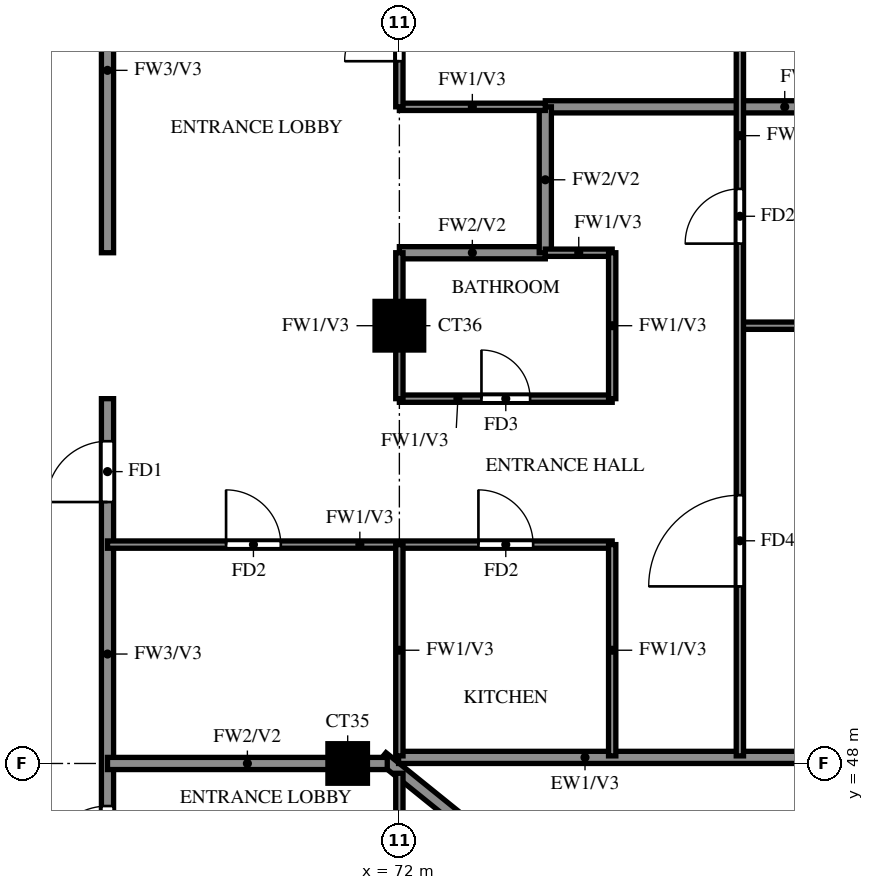
"""IFC4 building model, lengths in metres.
Left out: names, types, materials, properties, quantities, classifications, styles, units other than length and angle.
Written with IfcOpenShell. Run it as: python <this file> out.ifc"""

import sys

from ifc_helpers import new_model, si_unit, direction, frame, frame_2d, origin, origin_2d, place, context, subcontext, project, spatial, rectangle, extrude, source, transform, mapped, element, fill, save


model = new_model("IFC4")
c1 = context("Model", 3, precision=1e-05, world=origin(), true_north=direction((0.0, 1.0)))
c2 = subcontext(c1, "Body", "Model", "MODEL_VIEW")
j1 = project(units=[si_unit("LENGTHUNIT", "METRE"), si_unit("PLANEANGLEUNIT", "RADIAN")], contexts=[c1])
p1 = place(None, origin())
s1 = spatial("IfcSite", under=j1, at=p1, CompositionType="ELEMENT")
p2 = place(p1, origin())
s2 = spatial("IfcBuilding", under=s1, at=p2, CompositionType="ELEMENT")
p3 = place(p2, frame((0.0, 0.0, 243.0)))
s3 = spatial("IfcBuildingStorey", under=s2, at=p3, CompositionType="ELEMENT", Elevation=243.0)
m1 = source(origin(), c2, "Body", "SweptSolid", [
    extrude(rectangle(XDim=0.65, YDim=0.65, at=origin_2d()), origin(), (0.0, 0.0, 1.0), 3.22),
])
p4 = place(p3, frame((71.15, 48.0, 0.0), z_axis=(0.0, 0.0, 1.0), x_axis=(1.0, 0.0, 0.0)))
e1 = element("IfcColumn", 1, at=p4, inside=s3, PredefinedType="COLUMN", context=c2, shape_type="MappedRepresentation", body=[
    mapped(m1, transform((0.0, 0.0, 0.0))),
])
m2 = source(origin(), c2, "Body", "SweptSolid", [
    extrude(rectangle(XDim=0.8, YDim=0.8, at=origin_2d()), origin(), (0.0, 0.0, 1.0), 3.22),
])
p5 = place(p3, frame((72.0, 55.2, 0.0), z_axis=(0.0, 0.0, 1.0), x_axis=(1.0, 0.0, 0.0)))
e2 = element("IfcColumn", 2, at=p5, inside=s3, PredefinedType="COLUMN", context=c2, shape_type="MappedRepresentation", body=[
    mapped(m2, transform((0.0, 0.0, 0.0))),
])
p6 = place(p3, frame((81.907, 39.87, 0.0), z_axis=(0.0, 0.0, 1.0), x_axis=(-0.777936274417, 0.62834318087, 0.0)))
e3 = element("IfcWall", 3, at=p6, inside=s3, PredefinedType="SOLIDWALL", context=c2, shape_type="SweptSolid", body=[
    extrude(rectangle(XDim=13.099, YDim=0.2, at=frame_2d((6.549, 0.0))), origin(), (0.0, 0.0, 1.0), 3.22),
])
p7 = place(p6, frame((9.938, 0.0, 1.5)))
e4 = element("IfcOpeningElement", 4, at=p7, cuts=e3, PredefinedType="OPENING", context=c2, shape_type="SweptSolid", body=[
    extrude(rectangle(XDim=0.9, YDim=0.9, at=frame_2d((0.45, 0.45))), frame((0.0, 0.11, 0.0), z_axis=(0.0, -1.0, 0.0), x_axis=(1.0, 0.0, 0.0)), (0.0, 0.0, 1.0), 0.22),
])
p8 = place(p3, frame((71.987, 48.1, 0.0), z_axis=(0.0, 0.0, 1.0), x_axis=(1.0, 0.0, 0.0)))
e5 = element("IfcWall", 5, at=p8, inside=s3, PredefinedType="SOLIDWALL", context=c2, shape_type="SweptSolid", body=[
    extrude(rectangle(XDim=6.813, YDim=0.2, at=frame_2d((3.406, 0.0))), origin(), (0.0, 0.0, 1.0), 3.22),
])
p9 = place(p3, frame((67.2, 45.6, 0.0), z_axis=(0.0, 0.0, 1.0), x_axis=(0.0, 1.0, 0.0)))
e6 = element("IfcWall", 6, at=p9, inside=s3, PredefinedType="SOLIDWALL", context=c2, shape_type="SweptSolid", body=[
    extrude(rectangle(XDim=8.4, YDim=0.2, at=frame_2d((4.2, 0.0))), origin(), (0.0, 0.0, 1.0), 3.22),
])
p10 = place(p9, frame((6.7, 0.0, 0.0)))
e7 = element("IfcOpeningElement", 7, at=p10, cuts=e6, PredefinedType="OPENING", context=c2, shape_type="SweptSolid", body=[
    extrude(rectangle(XDim=1.0, YDim=2.1, at=frame_2d((0.5, 1.05))), frame((0.0, 0.11, 0.0), z_axis=(0.0, -1.0, 0.0), x_axis=(1.0, 0.0, 0.0)), (0.0, 0.0, 1.0), 0.22),
])
p11 = place(p9, frame((0.7, 0.0, 0.0)))
e8 = element("IfcOpeningElement", 8, at=p11, cuts=e6, PredefinedType="OPENING", context=c2, shape_type="SweptSolid", body=[
    extrude(rectangle(XDim=1.0, YDim=2.1, at=frame_2d((0.5, 1.05))), frame((0.0, 0.11, 0.0), z_axis=(0.0, -1.0, 0.0), x_axis=(1.0, 0.0, 0.0)), (0.0, 0.0, 1.0), 0.22),
])
p12 = place(p3, frame((67.2, 56.4, 0.0), z_axis=(0.0, 0.0, 1.0), x_axis=(0.0, 1.0, 0.0)))
e9 = element("IfcWall", 9, at=p12, inside=s3, PredefinedType="SOLIDWALL", context=c2, shape_type="SweptSolid", body=[
    extrude(rectangle(XDim=6.0, YDim=0.2, at=frame_2d((3.0, 0.0))), origin(), (0.0, 0.0, 1.0), 3.22),
])
p13 = place(p12, frame((3.7, 0.0, 0.0)))
e10 = element("IfcOpeningElement", 10, at=p13, cuts=e9, PredefinedType="OPENING", context=c2, shape_type="SweptSolid", body=[
    extrude(rectangle(XDim=1.0, YDim=2.1, at=frame_2d((0.5, 1.05))), frame((0.0, 0.11, 0.0), z_axis=(0.0, -1.0, 0.0), x_axis=(1.0, 0.0, 0.0)), (0.0, 0.0, 1.0), 0.22),
])
p14 = place(p3, frame((67.2, 48.0, 0.0), z_axis=(0.0, 0.0, 1.0), x_axis=(1.0, 0.0, 0.0)))
e11 = element("IfcWall", 11, at=p14, inside=s3, PredefinedType="SOLIDWALL", context=c2, shape_type="SweptSolid", body=[
    extrude(rectangle(XDim=4.601, YDim=0.2, at=frame_2d((2.301, 0.0))), origin(), (0.0, 0.0, 1.0), 3.22),
])
p15 = place(p3, frame((72.0, 56.4, 0.0), z_axis=(0.0, 0.0, 1.0), x_axis=(1.0, 0.0, 0.0)))
e12 = element("IfcWall", 12, at=p15, inside=s3, PredefinedType="SOLIDWALL", context=c2, shape_type="SweptSolid", body=[
    extrude(rectangle(XDim=2.4, YDim=0.2, at=frame_2d((1.2, 0.0))), origin(), (0.0, 0.0, 1.0), 3.22),
])
p16 = place(p3, frame((74.4, 58.8, 0.0), z_axis=(0.0, 0.0, 1.0), x_axis=(1.0, 0.0, 0.0)))
e13 = element("IfcWall", 13, at=p16, inside=s3, PredefinedType="SOLIDWALL", context=c2, shape_type="SweptSolid", body=[
    extrude(rectangle(XDim=7.875, YDim=0.2, at=frame_2d((3.938, 0.0))), origin(), (0.0, 0.0, 1.0), 2.32),
])
p17 = place(p3, frame((74.4, 56.4, 0.0), z_axis=(0.0, 0.0, 1.0), x_axis=(0.0, 1.0, 0.0)))
e14 = element("IfcWall", 14, at=p17, inside=s3, PredefinedType="SOLIDWALL", context=c2, shape_type="SweptSolid", body=[
    extrude(rectangle(XDim=2.4, YDim=0.2, at=frame_2d((1.2, 0.0))), origin(), (0.0, 0.0, 1.0), 3.22),
])
p18 = place(p3, frame((67.2, 51.6, 0.0), z_axis=(0.0, 0.0, 1.0), x_axis=(1.0, 0.0, 0.0)))
e15 = element("IfcWall", 15, at=p18, inside=s3, PredefinedType="PARTITIONING", context=c2, shape_type="SweptSolid", body=[
    extrude(rectangle(XDim=8.3, YDim=0.12, at=frame_2d((4.15, 0.0))), origin(), (0.0, 0.0, 1.0), 3.22),
])
p19 = place(p18, frame((6.1, 0.0, 0.0)))
e16 = element("IfcOpeningElement", 16, at=p19, cuts=e15, PredefinedType="OPENING", context=c2, shape_type="SweptSolid", body=[
    extrude(rectangle(XDim=0.9, YDim=2.1, at=frame_2d((0.45, 1.05))), frame((0.0, 0.07, 0.0), z_axis=(0.0, -1.0, 0.0), x_axis=(1.0, 0.0, 0.0)), (0.0, 0.0, 1.0), 0.14),
])
p20 = place(p18, frame((1.95, 0.0, 0.0)))
e17 = element("IfcOpeningElement", 17, at=p20, cuts=e15, PredefinedType="OPENING", context=c2, shape_type="SweptSolid", body=[
    extrude(rectangle(XDim=0.9, YDim=2.1, at=frame_2d((0.45, 1.05))), frame((0.0, 0.07, 0.0), z_axis=(0.0, -1.0, 0.0), x_axis=(1.0, 0.0, 0.0)), (0.0, 0.0, 1.0), 0.14),
])
p21 = place(p3, frame((72.0, 54.0, 0.0), z_axis=(0.0, 0.0, 1.0), x_axis=(1.0, 0.0, 0.0)))
e18 = element("IfcWall", 18, at=p21, inside=s3, PredefinedType="PARTITIONING", context=c2, shape_type="SweptSolid", body=[
    extrude(rectangle(XDim=3.5, YDim=0.12, at=frame_2d((1.75, 0.0))), origin(), (0.0, 0.0, 1.0), 3.22),
])
p22 = place(p21, frame((1.35, 0.0, 0.0)))
e19 = element("IfcOpeningElement", 19, at=p22, cuts=e18, PredefinedType="OPENING", context=c2, shape_type="SweptSolid", body=[
    extrude(rectangle(XDim=0.8, YDim=2.1, at=frame_2d((0.4, 1.05))), frame((0.0, 0.07, 0.0), z_axis=(0.0, -1.0, 0.0), x_axis=(1.0, 0.0, 0.0)), (0.0, 0.0, 1.0), 0.14),
])
p23 = place(p3, frame((77.6, 55.2, 0.0), z_axis=(0.0, 0.0, 1.0), x_axis=(1.0, 0.0, 0.0)))
e20 = element("IfcWall", 20, at=p23, inside=s3, PredefinedType="PARTITIONING", context=c2, shape_type="SweptSolid", body=[
    extrude(rectangle(XDim=4.675, YDim=0.12, at=frame_2d((2.337, 0.0))), origin(), (0.0, 0.0, 1.0), 3.22),
])
p24 = place(p3, frame((74.4, 56.4, 0.0), z_axis=(0.0, 0.0, 1.0), x_axis=(1.0, 0.0, 0.0)))
e21 = element("IfcWall", 21, at=p24, inside=s3, PredefinedType="PARTITIONING", context=c2, shape_type="SweptSolid", body=[
    extrude(rectangle(XDim=1.1, YDim=0.12, at=frame_2d((0.55, 0.0))), origin(), (0.0, 0.0, 1.0), 3.22),
])
p25 = place(p3, frame((72.0, 58.8, 0.0), z_axis=(0.0, 0.0, 1.0), x_axis=(1.0, 0.0, 0.0)))
e22 = element("IfcWall", 22, at=p25, inside=s3, PredefinedType="PARTITIONING", context=c2, shape_type="SweptSolid", body=[
    extrude(rectangle(XDim=2.4, YDim=0.12, at=frame_2d((1.2, 0.0))), origin(), (0.0, 0.0, 1.0), 3.22),
])
p26 = place(p3, frame((72.0, 39.725, 0.0), z_axis=(0.0, 0.0, 1.0), x_axis=(0.0, 1.0, 0.0)))
e23 = element("IfcWall", 23, at=p26, inside=s3, PredefinedType="PARTITIONING", context=c2, shape_type="SweptSolid", body=[
    extrude(rectangle(XDim=8.114, YDim=0.12, at=frame_2d((4.057, 0.0))), origin(), (0.0, 0.0, 1.0), 2.32),
])
p27 = place(p26, frame((1.788, 0.0, 0.0)))
e24 = element("IfcOpeningElement", 24, at=p27, cuts=e23, PredefinedType="OPENING", context=c2, shape_type="SweptSolid", body=[
    extrude(rectangle(XDim=0.9, YDim=2.1, at=frame_2d((0.45, 1.05))), frame((0.0, 0.07, 0.0), z_axis=(0.0, -1.0, 0.0), x_axis=(1.0, 0.0, 0.0)), (0.0, 0.0, 1.0), 0.14),
])
p28 = place(p26, frame((4.575, 0.0, 0.0)))
e25 = element("IfcOpeningElement", 25, at=p28, cuts=e23, PredefinedType="OPENING", context=c2, shape_type="SweptSolid", body=[
    extrude(rectangle(XDim=0.8, YDim=2.1, at=frame_2d((0.4, 1.05))), frame((0.0, 0.07, 0.0), z_axis=(0.0, -1.0, 0.0), x_axis=(1.0, 0.0, 0.0)), (0.0, 0.0, 1.0), 0.14),
])
p29 = place(p3, frame((72.0, 48.125, 0.0), z_axis=(0.0, 0.0, 1.0), x_axis=(0.0, 1.0, 0.0)))
e26 = element("IfcWall", 26, at=p29, inside=s3, PredefinedType="PARTITIONING", context=c2, shape_type="SweptSolid", body=[
    extrude(rectangle(XDim=3.475, YDim=0.12, at=frame_2d((1.738, 0.0))), origin(), (0.0, 0.0, 1.0), 3.22),
])
p30 = place(p3, frame((72.0, 54.0, 0.0), z_axis=(0.0, 0.0, 1.0), x_axis=(0.0, 1.0, 0.0)))
e27 = element("IfcWall", 27, at=p30, inside=s3, PredefinedType="PARTITIONING", context=c2, shape_type="SweptSolid", body=[
    extrude(rectangle(XDim=2.4, YDim=0.12, at=frame_2d((1.2, 0.0))), origin(), (0.0, 0.0, 1.0), 3.22),
])
p31 = place(p3, frame((72.0, 58.8, 0.0), z_axis=(0.0, 0.0, 1.0), x_axis=(0.0, 1.0, 0.0)))
e28 = element("IfcWall", 28, at=p31, inside=s3, PredefinedType="PARTITIONING", context=c2, shape_type="SweptSolid", body=[
    extrude(rectangle(XDim=3.6, YDim=0.12, at=frame_2d((1.8, 0.0))), origin(), (0.0, 0.0, 1.0), 3.22),
])
p32 = place(p31, frame((0.75, 0.0, 0.0)))
e29 = element("IfcOpeningElement", 29, at=p32, cuts=e28, PredefinedType="OPENING", context=c2, shape_type="SweptSolid", body=[
    extrude(rectangle(XDim=0.9, YDim=2.1, at=frame_2d((0.45, 1.05))), frame((0.0, 0.07, 0.0), z_axis=(0.0, -1.0, 0.0), x_axis=(1.0, 0.0, 0.0)), (0.0, 0.0, 1.0), 0.14),
])
p33 = place(p3, frame((75.5, 48.125, 0.0), z_axis=(0.0, 0.0, 1.0), x_axis=(0.0, 1.0, 0.0)))
e30 = element("IfcWall", 30, at=p33, inside=s3, PredefinedType="PARTITIONING", context=c2, shape_type="SweptSolid", body=[
    extrude(rectangle(XDim=3.475, YDim=0.12, at=frame_2d((1.738, 0.0))), origin(), (0.0, 0.0, 1.0), 3.22),
])
p34 = place(p3, frame((75.5, 54.0, 0.0), z_axis=(0.0, 0.0, 1.0), x_axis=(0.0, 1.0, 0.0)))
e31 = element("IfcWall", 31, at=p34, inside=s3, PredefinedType="PARTITIONING", context=c2, shape_type="SweptSolid", body=[
    extrude(rectangle(XDim=2.4, YDim=0.12, at=frame_2d((1.2, 0.0))), origin(), (0.0, 0.0, 1.0), 3.22),
])
p35 = place(p3, frame((77.6, 48.125, 0.0), z_axis=(0.0, 0.0, 1.0), x_axis=(0.0, 1.0, 0.0)))
e32 = element("IfcWall", 32, at=p35, inside=s3, PredefinedType="PARTITIONING", context=c2, shape_type="SweptSolid", body=[
    extrude(rectangle(XDim=21.475, YDim=0.12, at=frame_2d((10.738, 0.0))), origin(), (0.0, 0.0, 1.0), 3.22),
])
p36 = place(p35, frame((2.788, 0.0, 0.0)))
e33 = element("IfcOpeningElement", 33, at=p36, cuts=e32, PredefinedType="OPENING", context=c2, shape_type="SweptSolid", body=[
    extrude(rectangle(XDim=1.5, YDim=2.1, at=frame_2d((0.75, 1.05))), frame((0.0, 0.07, 0.0), z_axis=(0.0, -1.0, 0.0), x_axis=(1.0, 0.0, 0.0)), (0.0, 0.0, 1.0), 0.14),
])
p37 = place(p35, frame((8.425, 0.0, 0.0)))
e34 = element("IfcOpeningElement", 34, at=p37, cuts=e32, PredefinedType="OPENING", context=c2, shape_type="SweptSolid", body=[
    extrude(rectangle(XDim=0.9, YDim=2.1, at=frame_2d((0.45, 1.05))), frame((0.0, 0.07, 0.0), z_axis=(0.0, -1.0, 0.0), x_axis=(1.0, 0.0, 0.0)), (0.0, 0.0, 1.0), 0.14),
])
p38 = place(p35, frame((12.025, 0.0, 0.0)))
e35 = element("IfcOpeningElement", 35, at=p38, cuts=e32, PredefinedType="OPENING", context=c2, shape_type="SweptSolid", body=[
    extrude(rectangle(XDim=0.9, YDim=2.1, at=frame_2d((0.45, 1.05))), frame((0.0, 0.07, 0.0), z_axis=(0.0, -1.0, 0.0), x_axis=(1.0, 0.0, 0.0)), (0.0, 0.0, 1.0), 0.14),
])
p39 = place(p35, frame((17.425, 0.0, 0.0)))
e36 = element("IfcOpeningElement", 36, at=p39, cuts=e32, PredefinedType="OPENING", context=c2, shape_type="SweptSolid", body=[
    extrude(rectangle(XDim=0.9, YDim=2.1, at=frame_2d((0.45, 1.05))), frame((0.0, 0.07, 0.0), z_axis=(0.0, -1.0, 0.0), x_axis=(1.0, 0.0, 0.0)), (0.0, 0.0, 1.0), 0.14),
])
p40 = place(p10, origin())
e37 = element("IfcDoor", 37, at=p40, inside=s3, OperationType="SINGLE_SWING_RIGHT", PredefinedType="DOOR", context=c2, shape_type="SweptSolid", body=[
    extrude(rectangle(XDim=1.0, YDim=2.1, at=frame_2d((0.5, 1.05))), frame((0.0, 0.025, 0.0), z_axis=(0.0, -1.0, 0.0), x_axis=(1.0, 0.0, 0.0)), (0.0, 0.0, 1.0), 0.05),
])
fill(e7, e37)
p41 = place(p36, origin())
e38 = element("IfcDoor", 38, at=p41, inside=s3, OperationType="SINGLE_SWING_LEFT", PredefinedType="DOOR", context=c2, shape_type="SweptSolid", body=[
    extrude(rectangle(XDim=1.5, YDim=2.1, at=frame_2d((0.75, 1.05))), frame((0.0, 0.025, 0.0), z_axis=(0.0, -1.0, 0.0), x_axis=(1.0, 0.0, 0.0)), (0.0, 0.0, 1.0), 0.05),
])
fill(e33, e38)
p42 = place(p37, origin())
e39 = element("IfcDoor", 39, at=p42, inside=s3, OperationType="SINGLE_SWING_LEFT", PredefinedType="DOOR", context=c2, shape_type="SweptSolid", body=[
    extrude(rectangle(XDim=0.9, YDim=2.1, at=frame_2d((0.45, 1.05))), frame((0.0, 0.025, 0.0), z_axis=(0.0, -1.0, 0.0), x_axis=(1.0, 0.0, 0.0)), (0.0, 0.0, 1.0), 0.05),
])
fill(e34, e39)
p43 = place(p19, origin())
e40 = element("IfcDoor", 40, at=p43, inside=s3, OperationType="SINGLE_SWING_RIGHT", PredefinedType="DOOR", context=c2, shape_type="SweptSolid", body=[
    extrude(rectangle(XDim=0.9, YDim=2.1, at=frame_2d((0.45, 1.05))), frame((0.0, 0.025, 0.0), z_axis=(0.0, -1.0, 0.0), x_axis=(1.0, 0.0, 0.0)), (0.0, 0.0, 1.0), 0.05),
])
fill(e16, e40)
p44 = place(p22, origin())
e41 = element("IfcDoor", 41, at=p44, inside=s3, OperationType="SINGLE_SWING_LEFT", PredefinedType="DOOR", context=c2, shape_type="SweptSolid", body=[
    extrude(rectangle(XDim=0.8, YDim=2.1, at=frame_2d((0.4, 1.05))), frame((0.0, 0.025, 0.0), z_axis=(0.0, -1.0, 0.0), x_axis=(1.0, 0.0, 0.0)), (0.0, 0.0, 1.0), 0.05),
])
fill(e19, e41)
p45 = place(p20, origin())
e42 = element("IfcDoor", 42, at=p45, inside=s3, OperationType="SINGLE_SWING_LEFT", PredefinedType="DOOR", context=c2, shape_type="SweptSolid", body=[
    extrude(rectangle(XDim=0.9, YDim=2.1, at=frame_2d((0.45, 1.05))), frame((0.0, 0.025, 0.0), z_axis=(0.0, -1.0, 0.0), x_axis=(1.0, 0.0, 0.0)), (0.0, 0.0, 1.0), 0.05),
])
fill(e17, e42)
p46 = place(p32, origin())
e43 = element("IfcDoor", 43, at=p46, inside=s3, OperationType="SINGLE_SWING_LEFT", PredefinedType="DOOR", context=c2, shape_type="SweptSolid", body=[
    extrude(rectangle(XDim=0.9, YDim=2.1, at=frame_2d((0.45, 1.05))), frame((0.0, 0.025, 0.0), z_axis=(0.0, -1.0, 0.0), x_axis=(1.0, 0.0, 0.0)), (0.0, 0.0, 1.0), 0.05),
])
fill(e29, e43)
p47 = place(p11, origin())
e44 = element("IfcDoor", 44, at=p47, inside=s3, OperationType="SINGLE_SWING_LEFT", PredefinedType="DOOR", context=c2, shape_type="SweptSolid", body=[
    extrude(rectangle(XDim=1.0, YDim=2.1, at=frame_2d((0.5, 1.05))), frame((0.0, 0.025, 0.0), z_axis=(0.0, -1.0, 0.0), x_axis=(1.0, 0.0, 0.0)), (0.0, 0.0, 1.0), 0.05),
])
fill(e8, e44)
save(model, sys.argv[1])
